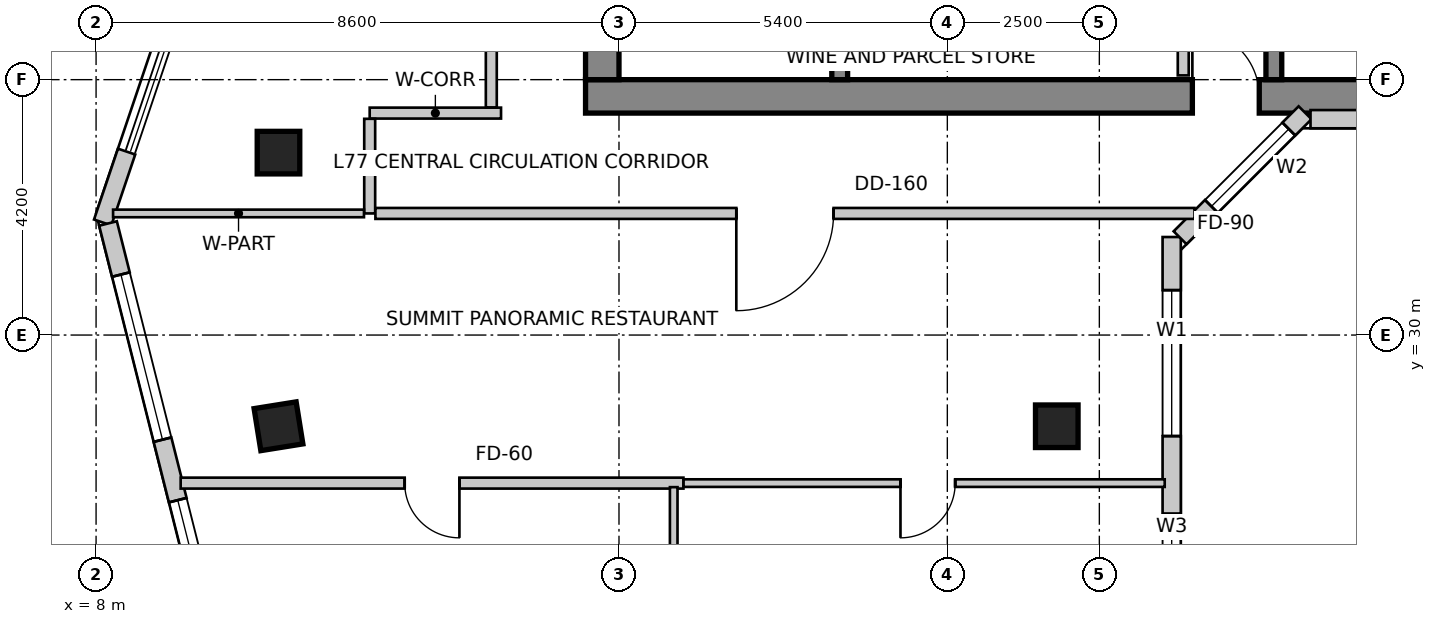
"""IFC4 building model, lengths in metres.
Left out: names, types, materials, properties, quantities, classifications, styles, units other than length and angle.
Written with IfcOpenShell. Run it as: python <this file> out.ifc"""

import sys

from ifc_helpers import new_model, si_unit, direction, frame, frame_2d, origin, origin_2d, place, context, subcontext, project, spatial, rectangle, extrude, source, transform, mapped, element, fill, save


model = new_model("IFC4")
c1 = context("Model", 3, precision=1e-05, world=origin(), true_north=direction((0.0, 1.0)))
c2 = subcontext(c1, "Body", "Model", "MODEL_VIEW")
j1 = project(units=[si_unit("LENGTHUNIT", "METRE"), si_unit("PLANEANGLEUNIT", "RADIAN")], contexts=[c1])
p1 = place(None, origin())
s1 = spatial("IfcSite", under=j1, at=p1, CompositionType="ELEMENT")
p2 = place(p1, origin())
s2 = spatial("IfcBuilding", under=s1, at=p2, CompositionType="ELEMENT")
p3 = place(p2, frame((0.0, 0.0, 300.5)))
s3 = spatial("IfcBuildingStorey", under=s2, at=p3, CompositionType="ELEMENT", Elevation=300.5)
p4 = place(p3, frame((16.05, 33.925, 0.0), z_axis=(0.0, 0.0, 1.0), x_axis=(1.0, 0.0, 0.0)))
e1 = element("IfcWall", 1, at=p4, inside=s3, PredefinedType="SHEAR", context=c2, shape_type="SweptSolid", body=[
    extrude(rectangle(XDim=15.5, YDim=0.55, at=frame_2d((7.75, 0.0))), origin(), (0.0, 0.0, 1.0), 4.0),
])
m1 = source(origin(), c2, "Body", "SweptSolid", [
    extrude(rectangle(XDim=1.1, YDim=2.15, at=frame_2d((0.55, 1.075))), frame((0.0, 0.285, 0.0), z_axis=(0.0, -1.0, 0.0), x_axis=(1.0, 0.0, 0.0)), (0.0, 0.0, 1.0), 0.57),
])
p5 = place(p4, frame((9.98, 0.0, 0.0)))
e2 = element("IfcOpeningElement", 2, at=p5, cuts=e1, PredefinedType="OPENING", context=c2, shape_type="MappedRepresentation", body=[
    mapped(m1, transform((0.0, 0.0, 0.0), scale=1.0)),
])
p6 = place(p3, frame((16.325, 34.2, 0.0), z_axis=(0.0, 0.0, 1.0), x_axis=(0.0, 1.0, 0.0)))
e3 = element("IfcWall", 3, at=p6, inside=s3, PredefinedType="SHEAR", context=c2, shape_type="SweptSolid", body=[
    extrude(rectangle(XDim=11.4, YDim=0.55, at=frame_2d((5.7, 0.0))), origin(), (0.0, 0.0, 1.0), 4.0),
])
p7 = place(p6, frame((7.15, 0.0, 0.0)))
e4 = element("IfcOpeningElement", 4, at=p7, cuts=e3, PredefinedType="OPENING", context=c2, shape_type="MappedRepresentation", body=[
    mapped(m1, transform((0.0, 0.0, 0.0), scale=1.0)),
])
p8 = place(p3, frame((20.23, 34.2, 0.0), z_axis=(0.0, 0.0, 1.0), x_axis=(0.0, 1.0, 0.0)))
e5 = element("IfcWall", 5, at=p8, inside=s3, PredefinedType="SHEAR", context=c2, shape_type="SweptSolid", body=[
    extrude(rectangle(XDim=9.06, YDim=0.26, at=frame_2d((4.53, 0.0))), origin(), (0.0, 0.0, 1.0), 4.0),
])
m2 = source(origin(), c2, "Body", "SweptSolid", [
    extrude(rectangle(XDim=1.1, YDim=2.15, at=frame_2d((0.55, 1.075))), frame((0.0, 0.14, 0.0), z_axis=(0.0, -1.0, 0.0), x_axis=(1.0, 0.0, 0.0)), (0.0, 0.0, 1.0), 0.28),
])
p9 = place(p8, frame((7.45, 0.0, 0.0)))
e6 = element("IfcOpeningElement", 6, at=p9, cuts=e5, PredefinedType="OPENING", context=c2, shape_type="MappedRepresentation", body=[
    mapped(m2, transform((0.0, 0.0, 0.0), scale=1.0)),
])
p10 = place(p3, frame((27.37, 34.2, 0.0), z_axis=(0.0, 0.0, 1.0), x_axis=(0.0, 1.0, 0.0)))
e7 = element("IfcWall", 7, at=p10, inside=s3, PredefinedType="SHEAR", context=c2, shape_type="SweptSolid", body=[
    extrude(rectangle(XDim=9.06, YDim=0.26, at=frame_2d((4.53, 0.0))), origin(), (0.0, 0.0, 1.0), 4.0),
])
p11 = place(p10, frame((7.45, 0.0, 0.0)))
e8 = element("IfcOpeningElement", 8, at=p11, cuts=e7, PredefinedType="OPENING", context=c2, shape_type="MappedRepresentation", body=[
    mapped(m2, transform((0.0, 0.0, 0.0), scale=1.0)),
])
m3 = source(origin(), c2, "Body", "SweptSolid", [
    extrude(rectangle(XDim=0.7, YDim=0.7, at=origin_2d()), origin(), (0.0, 0.0, 1.0), 4.0),
])
for number, where, z_axis, x_axis in (
    (9, (11.0, 33.0, 0.0), (0.0, 0.0, 1.0), (1.0, 0.0, 0.0)),
    (10, (11.0, 28.5, 0.0), (0.0, 0.0, 1.0), (0.158, -0.987, 0.0)),
    (11, (23.8, 28.5, 0.0), (0.0, 0.0, 1.0), (1.0, 0.0, 0.0)),
):
    element("IfcColumn", number, at=place(p3, frame(where, z_axis=z_axis, x_axis=x_axis)), inside=s3, PredefinedType="COLUMN", context=c2, shape_type="MappedRepresentation", body=[
        mapped(m3, transform((0.0, 0.0, 0.0), scale=1.0)),
    ])
p12 = place(p3, frame((25.69, 24.957, 0.0), z_axis=(0.0, 0.0, 1.0), x_axis=(0.0, 1.0, 0.0)))
e12 = element("IfcWall", 12, at=p12, inside=s3, PredefinedType="SOLIDWALL", context=c2, shape_type="SweptSolid", body=[
    extrude(rectangle(XDim=6.655, YDim=0.3, at=frame_2d((3.327, 0.0))), origin(), (0.0, 0.0, 1.0), 3.7),
])
m4 = source(origin(), c2, "Body", "SweptSolid", [
    extrude(rectangle(XDim=1.5, YDim=1.8, at=frame_2d((0.75, 0.9))), frame((0.0, 0.16, 0.0), z_axis=(0.0, -1.0, 0.0), x_axis=(1.0, 0.0, 0.0)), (0.0, 0.0, 1.0), 0.32),
])
p13 = place(p12, frame((0.604, 0.0, 0.85)))
e13 = element("IfcOpeningElement", 13, at=p13, cuts=e12, PredefinedType="OPENING", context=c2, shape_type="MappedRepresentation", body=[
    mapped(m4, transform((0.0, 0.0, 0.0), scale=1.0)),
])
m5 = source(origin(), c2, "Body", "SweptSolid", [
    extrude(rectangle(XDim=2.4, YDim=2.2, at=frame_2d((1.2, 1.1))), frame((0.0, 0.16, 0.0), z_axis=(0.0, -1.0, 0.0), x_axis=(1.0, 0.0, 0.0)), (0.0, 0.0, 1.0), 0.32),
])
p14 = place(p12, frame((3.381, 0.0, 0.85)))
e14 = element("IfcOpeningElement", 14, at=p14, cuts=e12, PredefinedType="OPENING", context=c2, shape_type="MappedRepresentation", body=[
    mapped(m5, transform((0.0, 0.0, 0.0), scale=1.0)),
])
p15 = place(p3, frame((25.828, 31.6, 0.0), z_axis=(0.0, 0.0, 1.0), x_axis=(0.707106781187, 0.707106781187, 0.0)))
e15 = element("IfcWall", 15, at=p15, inside=s3, PredefinedType="SOLIDWALL", context=c2, shape_type="SweptSolid", body=[
    extrude(rectangle(XDim=2.907, YDim=0.3, at=frame_2d((1.454, 0.0))), origin(), (0.0, 0.0, 1.0), 3.7),
])
m6 = source(origin(), c2, "Body", "SweptSolid", [
    extrude(rectangle(XDim=1.8, YDim=2.1, at=frame_2d((0.9, 1.05))), frame((0.0, 0.16, 0.0), z_axis=(0.0, -1.0, 0.0), x_axis=(1.0, 0.0, 0.0)), (0.0, 0.0, 1.0), 0.32),
])
p16 = place(p15, frame((0.729, 0.0, 0.85)))
e16 = element("IfcOpeningElement", 16, at=p16, cuts=e15, PredefinedType="OPENING", context=c2, shape_type="MappedRepresentation", body=[
    mapped(m6, transform((0.0, 0.0, 0.0), scale=1.0)),
])
p17 = place(p3, frame((27.973, 33.55, 0.0), z_axis=(0.0, 0.0, 1.0), x_axis=(1.0, 0.0, 0.0)))
e17 = element("IfcWall", 17, at=p17, inside=s3, PredefinedType="SOLIDWALL", context=c2, shape_type="SweptSolid", body=[
    extrude(rectangle(XDim=9.115, YDim=0.3, at=frame_2d((4.558, 0.0))), origin(), (0.0, 0.0, 1.0), 3.7),
])
p18 = place(p17, frame((1.239, 0.0, 0.85)))
e18 = element("IfcOpeningElement", 18, at=p18, cuts=e17, PredefinedType="OPENING", context=c2, shape_type="MappedRepresentation", body=[
    mapped(m5, transform((0.0, 0.0, 0.0), scale=1.0)),
])
m7 = source(origin(), c2, "Body", "SweptSolid", [
    extrude(rectangle(XDim=2.8, YDim=2.4, at=frame_2d((1.4, 1.2))), frame((0.0, 0.16, 0.0), z_axis=(0.0, -1.0, 0.0), x_axis=(1.0, 0.0, 0.0)), (0.0, 0.0, 1.0), 0.32),
])
p19 = place(p17, frame((5.276, 0.0, 0.85)))
e19 = element("IfcOpeningElement", 19, at=p19, cuts=e17, PredefinedType="OPENING", context=c2, shape_type="MappedRepresentation", body=[
    mapped(m7, transform((0.0, 0.0, 0.0), scale=1.0)),
])
p20 = place(p3, frame((8.502, 33.017, 0.0), z_axis=(0.0, 0.0, 1.0), x_axis=(-0.319798692732, -0.947485512357, 0.0)))
e20 = element("IfcWall", 20, at=p20, inside=s3, PredefinedType="SOLIDWALL", context=c2, shape_type="SweptSolid", body=[
    extrude(rectangle(XDim=1.23, YDim=0.3, at=frame_2d((0.615, 0.0))), origin(), (0.0, 0.0, 1.0), 3.7),
])
p21 = place(p3, frame((8.196, 31.835, 0.0), z_axis=(0.0, 0.0, 1.0), x_axis=(0.244430846523, -0.969666726906, 0.0)))
e21 = element("IfcWall", 21, at=p21, inside=s3, PredefinedType="SOLIDWALL", context=c2, shape_type="SweptSolid", body=[
    extrude(rectangle(XDim=7.152, YDim=0.3, at=frame_2d((3.576, 0.0))), origin(), (0.0, 0.0, 1.0), 3.7),
])
p22 = place(p21, frame((0.866, 0.0, 0.85)))
e22 = element("IfcOpeningElement", 22, at=p22, cuts=e21, PredefinedType="OPENING", context=c2, shape_type="MappedRepresentation", body=[
    mapped(m7, transform((0.0, 0.0, 0.0), scale=1.0)),
])
m8 = source(origin(), c2, "Body", "SweptSolid", [
    extrude(rectangle(XDim=2.1, YDim=2.0, at=frame_2d((1.05, 1.0))), frame((0.0, 0.16, 0.0), z_axis=(0.0, -1.0, 0.0), x_axis=(1.0, 0.0, 0.0)), (0.0, 0.0, 1.0), 0.32),
])
p23 = place(p21, frame((4.692, 0.0, 0.85)))
e23 = element("IfcOpeningElement", 23, at=p23, cuts=e21, PredefinedType="OPENING", context=c2, shape_type="MappedRepresentation", body=[
    mapped(m8, transform((0.0, 0.0, 0.0), scale=1.0)),
])
p24 = place(p3, frame((25.88, 35.956, 0.0), z_axis=(0.0, 0.0, 1.0), x_axis=(0.0, -1.0, 0.0)))
e24 = element("IfcWall", 24, at=p24, inside=s3, PredefinedType="PARTITIONING", context=c2, shape_type="SweptSolid", body=[
    extrude(rectangle(XDim=1.686, YDim=0.18, at=frame_2d((0.843, 0.0))), origin(), (0.0, 0.0, 1.0), 2.992),
])
p25 = place(p3, frame((12.5, 33.65, 0.0), z_axis=(0.0, 0.0, 1.0), x_axis=(1.0, 0.0, 0.0)))
e25 = element("IfcWall", 25, at=p25, inside=s3, PredefinedType="PARTITIONING", context=c2, shape_type="SweptSolid", body=[
    extrude(rectangle(XDim=2.16, YDim=0.18, at=frame_2d((1.08, 0.0))), origin(), (0.0, 0.0, 1.0), 3.7),
])
p26 = place(p3, frame((12.5, 32.0, 0.0), z_axis=(0.0, 0.0, 1.0), x_axis=(0.0, 1.0, 0.0)))
e26 = element("IfcWall", 26, at=p26, inside=s3, PredefinedType="PARTITIONING", context=c2, shape_type="SweptSolid", body=[
    extrude(rectangle(XDim=1.556, YDim=0.18, at=frame_2d((0.778, 0.0))), origin(), (0.0, 0.0, 1.0), 3.384),
])
p27 = place(p3, frame((26.065, 32.0, 0.0), z_axis=(0.0, 0.0, 1.0), x_axis=(-1.0, 0.0, 0.0)))
e27 = element("IfcWall", 27, at=p27, inside=s3, PredefinedType="PARTITIONING", context=c2, shape_type="SweptSolid", body=[
    extrude(rectangle(XDim=13.471, YDim=0.18, at=frame_2d((6.736, 0.0))), origin(), (0.0, 0.0, 1.0), 3.384),
])
m9 = source(origin(), c2, "Body", "SweptSolid", [
    extrude(rectangle(XDim=1.6, YDim=2.15, at=frame_2d((0.8, 1.075))), frame((0.0, 0.1, 0.0), z_axis=(0.0, -1.0, 0.0), x_axis=(1.0, 0.0, 0.0)), (0.0, 0.0, 1.0), 0.2),
])
p28 = place(p27, frame((5.936, 0.0, 0.0)))
e28 = element("IfcOpeningElement", 28, at=p28, cuts=e27, PredefinedType="OPENING", context=c2, shape_type="MappedRepresentation", body=[
    mapped(m9, transform((0.0, 0.0, 0.0), scale=1.0)),
])
p29 = place(p3, frame((14.5, 33.744, 0.0), z_axis=(0.0, 0.0, 1.0), x_axis=(0.0, 1.0, 0.0)))
e29 = element("IfcWall", 29, at=p29, inside=s3, PredefinedType="PARTITIONING", context=c2, shape_type="SweptSolid", body=[
    extrude(rectangle(XDim=12.406, YDim=0.18, at=frame_2d((6.203, 0.0))), origin(), (0.0, 0.0, 1.0), 3.7),
])
m10 = source(origin(), c2, "Body", "SweptSolid", [
    extrude(rectangle(XDim=0.9, YDim=2.15, at=frame_2d((0.45, 1.075))), frame((0.0, 0.1, 0.0), z_axis=(0.0, -1.0, 0.0), x_axis=(1.0, 0.0, 0.0)), (0.0, 0.0, 1.0), 0.2),
])
p30 = place(p29, frame((4.37, 0.0, 0.0)))
e30 = element("IfcOpeningElement", 30, at=p30, cuts=e29, PredefinedType="OPENING", context=c2, shape_type="MappedRepresentation", body=[
    mapped(m10, transform((0.0, 0.0, 0.0), scale=1.0)),
])
p31 = place(p3, frame((12.406, 32.0, 0.0), z_axis=(0.0, 0.0, 1.0), x_axis=(-1.0, 0.0, 0.0)))
e31 = element("IfcWall", 31, at=p31, inside=s3, PredefinedType="PARTITIONING", context=c2, shape_type="SweptSolid", body=[
    extrude(rectangle(XDim=4.126, YDim=0.125, at=frame_2d((2.063, 0.0))), origin(), (0.0, 0.0, 1.0), 2.992),
])
p32 = place(p3, frame((17.66, 27.565, 0.0), z_axis=(0.0, 0.0, 1.0), x_axis=(-1.0, 0.0, 0.0)))
e32 = element("IfcWall", 32, at=p32, inside=s3, PredefinedType="PARTITIONING", context=c2, shape_type="SweptSolid", body=[
    extrude(rectangle(XDim=8.269, YDim=0.18, at=frame_2d((4.134, 0.0))), origin(), (0.0, 0.0, 1.0), 3.384),
])
p33 = place(p32, frame((3.684, 0.0, 0.0)))
e33 = element("IfcOpeningElement", 33, at=p33, cuts=e32, PredefinedType="OPENING", context=c2, shape_type="MappedRepresentation", body=[
    mapped(m10, transform((0.0, 0.0, 0.0), scale=1.0)),
])
p34 = place(p3, frame((25.575, 27.565, 0.0), z_axis=(0.0, 0.0, 1.0), x_axis=(-1.0, 0.0, 0.0)))
e34 = element("IfcWall", 34, at=p34, inside=s3, PredefinedType="PARTITIONING", context=c2, shape_type="SweptSolid", body=[
    extrude(rectangle(XDim=7.913, YDim=0.125, at=frame_2d((3.957, 0.0))), origin(), (0.0, 0.0, 1.0), 2.992),
])
m11 = source(origin(), c2, "Body", "SweptSolid", [
    extrude(rectangle(XDim=0.9, YDim=2.15, at=frame_2d((0.45, 1.075))), frame((0.0, 0.073, 0.0), z_axis=(0.0, -1.0, 0.0), x_axis=(1.0, 0.0, 0.0)), (0.0, 0.0, 1.0), 0.145),
])
p35 = place(p34, frame((3.446, 0.0, 0.0)))
e35 = element("IfcOpeningElement", 35, at=p35, cuts=e34, PredefinedType="OPENING", context=c2, shape_type="MappedRepresentation", body=[
    mapped(m11, transform((0.0, 0.0, 0.0), scale=1.0)),
])
p36 = place(p3, frame((17.5, 27.499, 0.0), z_axis=(0.0, 0.0, 1.0), x_axis=(0.0, -1.0, 0.0)))
e36 = element("IfcWall", 36, at=p36, inside=s3, PredefinedType="PARTITIONING", context=c2, shape_type="SweptSolid", body=[
    extrude(rectangle(XDim=5.734, YDim=0.125, at=frame_2d((2.867, 0.0))), origin(), (0.0, 0.0, 1.0), 3.384),
])
m12 = source(origin(), c2, "Body", "SweptSolid", [
    extrude(rectangle(XDim=1.5, YDim=1.8, at=frame_2d((0.75, 0.9))), frame((0.0, -0.015, 0.0), z_axis=(0.0, -1.0, 0.0), x_axis=(1.0, 0.0, 0.0)), (0.0, 0.0, 1.0), 0.06),
])
p37 = place(p13, origin())
e37 = element("IfcWindow", 37, at=p37, inside=s3, PartitioningType="SINGLE_PANEL", PredefinedType="WINDOW", context=c2, shape_type="MappedRepresentation", body=[
    mapped(m12, transform((0.0, 0.0, 0.0), scale=1.0)),
])
fill(e13, e37)
m13 = source(origin(), c2, "Body", "SweptSolid", [
    extrude(rectangle(XDim=2.4, YDim=2.2, at=frame_2d((1.2, 1.1))), frame((0.0, -0.015, 0.0), z_axis=(0.0, -1.0, 0.0), x_axis=(1.0, 0.0, 0.0)), (0.0, 0.0, 1.0), 0.06),
])
p38 = place(p14, origin())
e38 = element("IfcWindow", 38, at=p38, inside=s3, PartitioningType="SINGLE_PANEL", PredefinedType="WINDOW", context=c2, shape_type="MappedRepresentation", body=[
    mapped(m13, transform((0.0, 0.0, 0.0), scale=1.0)),
])
fill(e14, e38)
m14 = source(origin(), c2, "Body", "SweptSolid", [
    extrude(rectangle(XDim=1.8, YDim=2.1, at=frame_2d((0.9, 1.05))), frame((0.0, -0.015, 0.0), z_axis=(0.0, -1.0, 0.0), x_axis=(1.0, 0.0, 0.0)), (0.0, 0.0, 1.0), 0.06),
])
p39 = place(p16, origin())
e39 = element("IfcWindow", 39, at=p39, inside=s3, PartitioningType="SINGLE_PANEL", PredefinedType="WINDOW", context=c2, shape_type="MappedRepresentation", body=[
    mapped(m14, transform((0.0, 0.0, 0.0), scale=1.0)),
])
fill(e16, e39)
m15 = source(origin(), c2, "Body", "SweptSolid", [
    extrude(rectangle(XDim=2.8, YDim=2.4, at=frame_2d((1.4, 1.2))), frame((0.0, -0.015, 0.0), z_axis=(0.0, -1.0, 0.0), x_axis=(1.0, 0.0, 0.0)), (0.0, 0.0, 1.0), 0.06),
])
p40 = place(p22, origin())
e40 = element("IfcWindow", 40, at=p40, inside=s3, PartitioningType="SINGLE_PANEL", PredefinedType="WINDOW", context=c2, shape_type="MappedRepresentation", body=[
    mapped(m15, transform((0.0, 0.0, 0.0), scale=1.0)),
])
fill(e22, e40)
m16 = source(origin(), c2, "Body", "SweptSolid", [
    extrude(rectangle(XDim=2.1, YDim=2.0, at=frame_2d((1.05, 1.0))), frame((0.0, -0.015, 0.0), z_axis=(0.0, -1.0, 0.0), x_axis=(1.0, 0.0, 0.0)), (0.0, 0.0, 1.0), 0.06),
])
p41 = place(p23, origin())
e41 = element("IfcWindow", 41, at=p41, inside=s3, PartitioningType="SINGLE_PANEL", PredefinedType="WINDOW", context=c2, shape_type="MappedRepresentation", body=[
    mapped(m16, transform((0.0, 0.0, 0.0), scale=1.0)),
])
fill(e23, e41)
m17 = source(origin(), c2, "Body", "SweptSolid", [
    extrude(rectangle(XDim=1.1, YDim=2.15, at=frame_2d((0.55, 1.075))), frame((0.0, 0.025, 0.0), z_axis=(0.0, -1.0, 0.0), x_axis=(1.0, 0.0, 0.0)), (0.0, 0.0, 1.0), 0.05),
])
p42 = place(p5, origin())
e42 = element("IfcDoor", 42, at=p42, inside=s3, OperationType="SINGLE_SWING_LEFT", PredefinedType="DOOR", context=c2, shape_type="MappedRepresentation", body=[
    mapped(m17, transform((0.0, 0.0, 0.0), scale=1.0)),
])
fill(e2, e42)
m18 = source(origin(), c2, "Body", "SweptSolid", [
    extrude(rectangle(XDim=1.6, YDim=2.15, at=frame_2d((0.8, 1.075))), frame((0.0, 0.025, 0.0), z_axis=(0.0, -1.0, 0.0), x_axis=(1.0, 0.0, 0.0)), (0.0, 0.0, 1.0), 0.05),
])
p43 = place(p28, origin())
e43 = element("IfcDoor", 43, at=p43, inside=s3, OperationType="SINGLE_SWING_RIGHT", PredefinedType="DOOR", context=c2, shape_type="MappedRepresentation", body=[
    mapped(m18, transform((0.0, 0.0, 0.0), scale=1.0)),
])
fill(e28, e43)
m19 = source(origin(), c2, "Body", "SweptSolid", [
    extrude(rectangle(XDim=0.9, YDim=2.15, at=frame_2d((0.45, 1.075))), frame((0.0, 0.025, 0.0), z_axis=(0.0, -1.0, 0.0), x_axis=(1.0, 0.0, 0.0)), (0.0, 0.0, 1.0), 0.05),
])
p44 = place(p33, origin())
e44 = element("IfcDoor", 44, at=p44, inside=s3, OperationType="SINGLE_SWING_LEFT", PredefinedType="DOOR", context=c2, shape_type="MappedRepresentation", body=[
    mapped(m19, transform((0.0, 0.0, 0.0), scale=1.0)),
])
fill(e33, e44)
m20 = source(origin(), c2, "Body", "SweptSolid", [
    extrude(rectangle(XDim=0.9, YDim=2.15, at=frame_2d((0.45, 1.075))), frame((0.0, 0.025, 0.0), z_axis=(0.0, -1.0, 0.0), x_axis=(1.0, 0.0, 0.0)), (0.0, 0.0, 1.0), 0.05),
])
p45 = place(p35, origin())
e45 = element("IfcDoor", 45, at=p45, inside=s3, OperationType="SINGLE_SWING_RIGHT", PredefinedType="DOOR", context=c2, shape_type="MappedRepresentation", body=[
    mapped(m20, transform((0.0, 0.0, 0.0), scale=1.0)),
])
fill(e35, e45)
save(model, sys.argv[1])
